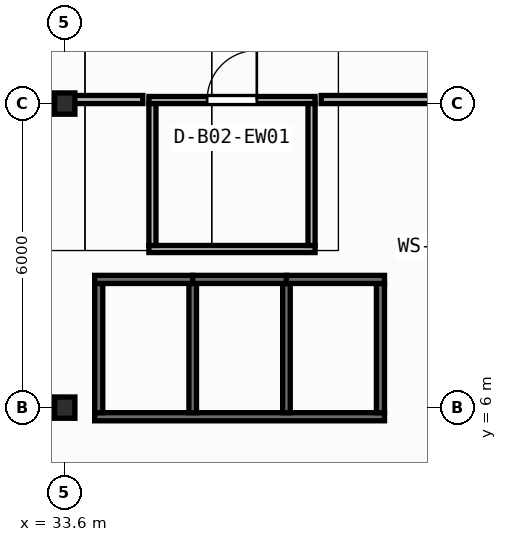
"""IFC4 building model, lengths in metres.
Left out: names, types, materials, properties, quantities, classifications, styles, units other than length and angle.
Written with IfcOpenShell. Run it as: python <this file> out.ifc"""

import sys

from ifc_helpers import new_model, si_unit, direction, frame, frame_2d, origin, origin_2d, place, context, subcontext, project, spatial, rectangle, i_section, extrude, element, fill, save


model = new_model("IFC4")
c1 = context("Model", 3, precision=1e-05, world=origin(), true_north=direction((0.0, 1.0)))
c2 = subcontext(c1, "Body", "Model", "MODEL_VIEW")
j1 = project(units=[si_unit("LENGTHUNIT", "METRE"), si_unit("PLANEANGLEUNIT", "RADIAN")], contexts=[c1])
p1 = place(None, origin())
s1 = spatial("IfcSite", under=j1, at=p1, CompositionType="ELEMENT")
p2 = place(p1, origin())
s2 = spatial("IfcBuilding", under=s1, at=p2, CompositionType="ELEMENT")
p3 = place(p2, frame((0.0, 0.0, -9.0)))
s3 = spatial("IfcBuildingStorey", under=s2, at=p3, CompositionType="ELEMENT", Elevation=-9.0)
for number, where, z_axis, x_axis in (
    (1, (33.6, 6.0, 0.0), (0.0, 0.0, 1.0), (1.0, 0.0, 0.0)),
    (2, (33.6, 12.0, 0.0), (0.0, 0.0, 1.0), (1.0, 0.0, 0.0)),
):
    element("IfcColumn", number, at=place(p3, frame(where, z_axis=z_axis, x_axis=x_axis)), inside=s3, PredefinedType="COLUMN", context=c2, shape_type="SweptSolid", body=[
        extrude(i_section(OverallWidth=0.4, OverallDepth=0.42, WebThickness=0.025, FlangeThickness=0.04, at=origin_2d()), origin(), (0.0, 0.0, 1.0), 4.5),
    ])
p4 = place(p3, frame((34.19, 5.82, 0.0), z_axis=(0.0, 0.0, 1.0), x_axis=(1.0, 0.0, 0.0)))
e3 = element("IfcWall", 3, at=p4, inside=s3, PredefinedType="SHEAR", context=c2, shape_type="SweptSolid", body=[
    extrude(rectangle(XDim=5.72, YDim=0.16, at=frame_2d((2.86, 0.0))), origin(), (0.0, 0.0, 1.0), 4.24),
])
for number, where, z_axis, x_axis in (
    (4, (34.27, 5.9, 0.0), (0.0, 0.0, 1.0), (0.0, 1.0, 0.0)),
    (5, (39.83, 5.9, 0.0), (0.0, 0.0, 1.0), (0.0, 1.0, 0.0)),
):
    element("IfcWall", number, at=place(p3, frame(where, z_axis=z_axis, x_axis=x_axis)), inside=s3, PredefinedType="SHEAR", context=c2, shape_type="SweptSolid", body=[
        extrude(rectangle(XDim=2.55, YDim=0.16, at=frame_2d((1.275, 0.0))), origin(), (0.0, 0.0, 1.0), 4.24),
    ])
for number, where, z_axis, x_axis in (
    (6, (36.125, 5.9, 0.0), (0.0, 0.0, 1.0), (0.0, 1.0, 0.0)),
    (7, (37.975, 5.9, 0.0), (0.0, 0.0, 1.0), (0.0, 1.0, 0.0)),
):
    element("IfcWall", number, at=place(p3, frame(where, z_axis=z_axis, x_axis=x_axis)), inside=s3, PredefinedType="SHEAR", context=c2, shape_type="SweptSolid", body=[
        extrude(rectangle(XDim=2.55, YDim=0.15, at=frame_2d((1.275, 0.0))), origin(), (0.0, 0.0, 1.0), 4.24),
    ])
p5 = place(p3, frame((34.19, 8.53, 0.0), z_axis=(0.0, 0.0, 1.0), x_axis=(1.0, 0.0, 0.0)))
e8 = element("IfcWall", 8, at=p5, inside=s3, PredefinedType="SHEAR", context=c2, shape_type="SweptSolid", body=[
    extrude(rectangle(XDim=1.935, YDim=0.16, at=frame_2d((0.968, 0.0))), origin(), (0.0, 0.0, 1.0), 4.24),
])
p6 = place(p3, frame((36.125, 8.53, 0.0), z_axis=(0.0, 0.0, 1.0), x_axis=(1.0, 0.0, 0.0)))
e9 = element("IfcWall", 9, at=p6, inside=s3, PredefinedType="SHEAR", context=c2, shape_type="SweptSolid", body=[
    extrude(rectangle(XDim=1.85, YDim=0.16, at=frame_2d((0.925, 0.0))), origin(), (0.0, 0.0, 1.0), 4.24),
])
p7 = place(p3, frame((37.975, 8.53, 0.0), z_axis=(0.0, 0.0, 1.0), x_axis=(1.0, 0.0, 0.0)))
e10 = element("IfcWall", 10, at=p7, inside=s3, PredefinedType="SHEAR", context=c2, shape_type="SweptSolid", body=[
    extrude(rectangle(XDim=1.935, YDim=0.16, at=frame_2d((0.967, 0.0))), origin(), (0.0, 0.0, 1.0), 4.24),
])
p8 = place(p3, frame((35.26, 9.13, 0.0), z_axis=(0.0, 0.0, 1.0), x_axis=(1.0, 0.0, 0.0)))
e11 = element("IfcWall", 11, at=p8, inside=s3, PredefinedType="PARTITIONING", context=c2, shape_type="SweptSolid", body=[
    extrude(rectangle(XDim=3.28, YDim=0.14, at=frame_2d((1.64, 0.0))), origin(), (0.0, 0.0, 1.0), 4.008),
])
p9 = place(p3, frame((35.26, 12.07, 0.0), z_axis=(0.0, 0.0, 1.0), x_axis=(1.0, 0.0, 0.0)))
e12 = element("IfcWall", 12, at=p9, inside=s3, PredefinedType="PARTITIONING", context=c2, shape_type="SweptSolid", body=[
    extrude(rectangle(XDim=3.28, YDim=0.14, at=frame_2d((1.64, 0.0))), origin(), (0.0, 0.0, 1.0), 3.305),
])
p10 = place(p9, frame((1.15, 0.0, 0.0)))
e13 = element("IfcOpeningElement", 13, at=p10, cuts=e12, PredefinedType="OPENING", context=c2, shape_type="SweptSolid", body=[
    extrude(rectangle(XDim=0.98, YDim=2.1, at=frame_2d((0.49, 1.05))), frame((0.0, 0.08, 0.0), z_axis=(0.0, -1.0, 0.0), x_axis=(1.0, 0.0, 0.0)), (0.0, 0.0, 1.0), 0.16),
])
for number, where, z_axis, x_axis in (
    (14, (35.33, 9.2, 0.0), (0.0, 0.0, 1.0), (0.0, 1.0, 0.0)),
    (15, (38.47, 9.2, 0.0), (0.0, 0.0, 1.0), (0.0, 1.0, 0.0)),
):
    element("IfcWall", number, at=place(p3, frame(where, z_axis=z_axis, x_axis=x_axis)), inside=s3, PredefinedType="PARTITIONING", context=c2, shape_type="SweptSolid", body=[
        extrude(rectangle(XDim=2.8, YDim=0.14, at=frame_2d((1.4, 0.0))), origin(), (0.0, 0.0, 1.0), 4.24),
    ])
p11 = place(p3, frame((31.63, 12.08, 0.0), z_axis=(0.0, 0.0, 1.0), x_axis=(1.0, 0.0, 0.0)))
e16 = element("IfcWall", 16, at=p11, inside=s3, PredefinedType="PARTITIONING", context=c2, shape_type="SweptSolid", body=[
    extrude(rectangle(XDim=3.51, YDim=0.16, at=frame_2d((1.755, 0.0))), origin(), (0.0, 0.0, 1.0), 3.305),
])
p12 = place(p3, frame((38.659, 12.08, 0.0), z_axis=(0.0, 0.0, 1.0), x_axis=(1.0, 0.0, 0.0)))
e17 = element("IfcWall", 17, at=p12, inside=s3, PredefinedType="PARTITIONING", context=c2, shape_type="SweptSolid", body=[
    extrude(rectangle(XDim=4.151, YDim=0.16, at=frame_2d((2.076, 0.0))), origin(), (0.0, 0.0, 1.0), 3.305),
])
p13 = place(p10, origin())
e18 = element("IfcDoor", 18, at=p13, inside=s3, OperationType="SINGLE_SWING_RIGHT", PredefinedType="DOOR", context=c2, shape_type="SweptSolid", body=[
    extrude(rectangle(XDim=0.98, YDim=2.1, at=frame_2d((0.49, 1.05))), frame((0.0, 0.025, 0.0), z_axis=(0.0, -1.0, 0.0), x_axis=(1.0, 0.0, 0.0)), (0.0, 0.0, 1.0), 0.05),
])
fill(e13, e18)
save(model, sys.argv[1])
